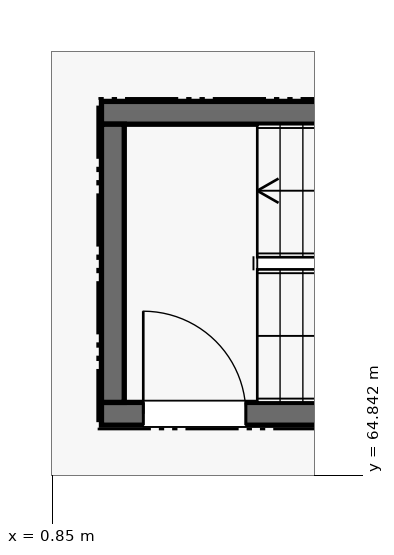
"""IFC4 building model, lengths in metres.
Left out: names, types, materials, properties, quantities, classifications, styles, units other than length and angle.
Written with IfcOpenShell. Run it as: python <this file> out.ifc"""

import sys

from ifc_helpers import new_model, si_unit, direction, frame, frame_2d, origin, place, context, subcontext, project, spatial, rectangle, extrude, element, fill, save


model = new_model("IFC4")
c1 = context("Model", 3, precision=1e-05, world=origin(), true_north=direction((0.0, 1.0)))
c2 = subcontext(c1, "Body", "Model", "MODEL_VIEW")
j1 = project(units=[si_unit("LENGTHUNIT", "METRE"), si_unit("PLANEANGLEUNIT", "RADIAN")], contexts=[c1])
p1 = place(None, origin())
s1 = spatial("IfcSite", under=j1, at=p1, CompositionType="ELEMENT")
p2 = place(p1, origin())
s2 = spatial("IfcBuilding", under=s1, at=p2, CompositionType="ELEMENT")
p3 = place(p2, frame((0.0, 0.0, 5.4)))
s3 = spatial("IfcBuildingStorey", under=s2, at=p3, CompositionType="ELEMENT", Elevation=5.4)
p4 = place(p3, frame((1.5, 65.65, 0.0), z_axis=(0.0, 0.0, 1.0), x_axis=(1.0, 0.0, 0.0)))
e1 = element("IfcWall", 1, at=p4, inside=s3, PredefinedType="SHEAR", context=c2, shape_type="SweptSolid", body=[
    extrude(rectangle(XDim=8.65, YDim=0.3, at=frame_2d((4.325, 0.0))), origin(), (0.0, 0.0, 1.0), 4.28),
])
p5 = place(p4, frame((0.55, 0.0, 0.0)))
e2 = element("IfcOpeningElement", 2, at=p5, cuts=e1, PredefinedType="OPENING", context=c2, shape_type="SweptSolid", body=[
    extrude(rectangle(XDim=1.35, YDim=2.2, at=frame_2d((0.675, 1.1))), frame((0.0, 0.16, 0.0), z_axis=(0.0, -1.0, 0.0), x_axis=(1.0, 0.0, 0.0)), (0.0, 0.0, 1.0), 0.32),
])
p6 = place(p3, frame((10.15, 69.61, 0.0), z_axis=(0.0, 0.0, 1.0), x_axis=(-1.0, 0.0, 0.0)))
e3 = element("IfcWall", 3, at=p6, inside=s3, PredefinedType="SHEAR", context=c2, shape_type="SweptSolid", body=[
    extrude(rectangle(XDim=8.65, YDim=0.3, at=frame_2d((4.325, 0.0))), origin(), (0.0, 0.0, 1.0), 4.28),
])
p7 = place(p3, frame((1.65, 69.46, 0.0), z_axis=(0.0, 0.0, 1.0), x_axis=(0.0, -1.0, 0.0)))
e4 = element("IfcWall", 4, at=p7, inside=s3, PredefinedType="SHEAR", context=c2, shape_type="SweptSolid", body=[
    extrude(rectangle(XDim=3.66, YDim=0.3, at=frame_2d((1.83, 0.0))), origin(), (0.0, 0.0, 1.0), 4.28),
])
p8 = place(p5, origin())
e5 = element("IfcDoor", 5, at=p8, inside=s3, OperationType="SINGLE_SWING_LEFT", PredefinedType="DOOR", context=c2, shape_type="SweptSolid", body=[
    extrude(rectangle(XDim=1.35, YDim=2.2, at=frame_2d((0.675, 1.1))), frame((0.0, 0.025, 0.0), z_axis=(0.0, -1.0, 0.0), x_axis=(1.0, 0.0, 0.0)), (0.0, 0.0, 1.0), 0.05),
])
fill(e2, e5)
save(model, sys.argv[1])
